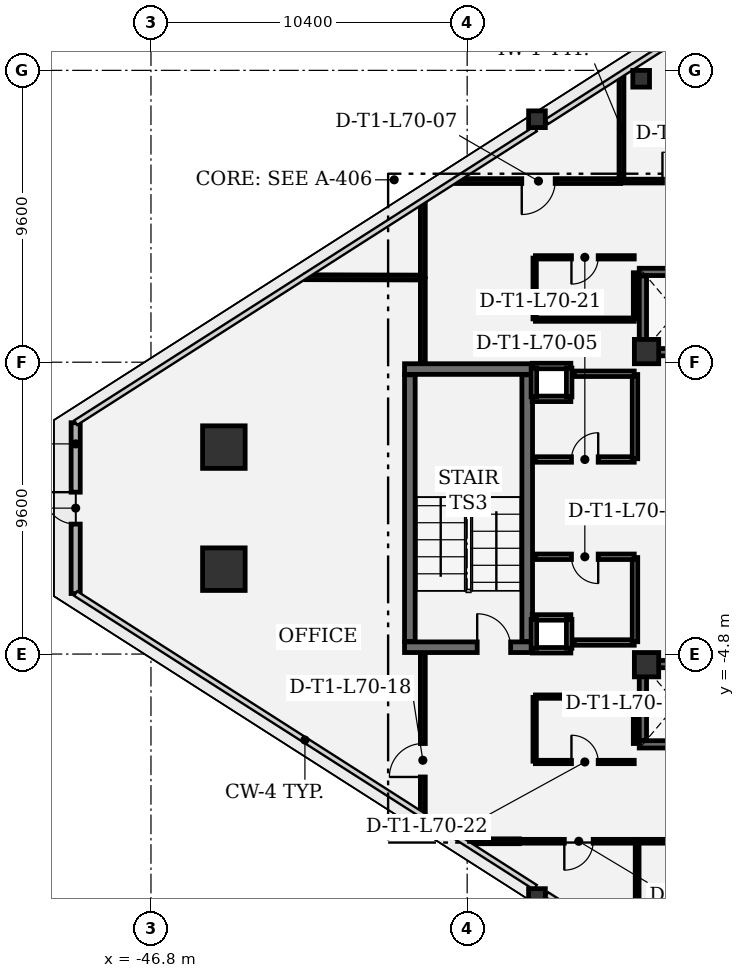
"""IFC4 building model, lengths in metres.
Left out: names, types, materials, properties, quantities, classifications, styles, units other than length and angle.
Written with IfcOpenShell. Run it as: python <this file> out.ifc"""

import sys

from ifc_helpers import new_model, si_unit, direction, frame, frame_2d, origin, origin_2d, place, context, subcontext, project, spatial, rectangle, extrude, element, fill, save


model = new_model("IFC4")
c1 = context("Model", 3, precision=1e-05, world=origin(), true_north=direction((0.0, 1.0)))
c2 = subcontext(c1, "Body", "Model", "MODEL_VIEW")
j1 = project(units=[si_unit("LENGTHUNIT", "METRE"), si_unit("PLANEANGLEUNIT", "RADIAN")], contexts=[c1])
p1 = place(None, origin())
s1 = spatial("IfcSite", under=j1, at=p1, CompositionType="ELEMENT")
p2 = place(p1, origin())
s2 = spatial("IfcBuilding", under=s1, at=p2, CompositionType="ELEMENT")
p3 = place(p2, frame((0.0, 0.0, 301.8)))
s3 = spatial("IfcBuildingStorey", under=s2, at=p3, CompositionType="ELEMENT", Elevation=301.8)
for number, where, z_axis, x_axis in (
    (1, (-44.403, 2.008, 0.0), (0.0, 0.0, 1.0), (1.0, 0.0, 0.0)),
    (2, (-44.403, -2.008, 0.0), (0.0, 0.0, 1.0), (1.0, 0.0, 0.0)),
):
    element("IfcColumn", number, at=place(p3, frame(where, z_axis=z_axis, x_axis=x_axis)), inside=s3, PredefinedType="COLUMN", context=c2, shape_type="SweptSolid", body=[
        extrude(rectangle(XDim=1.4, YDim=1.4, at=origin_2d()), origin(), (0.0, 0.0, 1.0), 4.2),
    ])
for number, where, z_axis, x_axis in (
    (3, (-30.5, 5.15, 0.0), (0.0, 0.0, 1.0), (1.0, 0.0, 0.0)),
    (4, (-30.5, -5.15, 0.0), (0.0, 0.0, 1.0), (1.0, 0.0, 0.0)),
):
    element("IfcColumn", number, at=place(p3, frame(where, z_axis=z_axis, x_axis=x_axis)), inside=s3, PredefinedType="COLUMN", context=c2, shape_type="SweptSolid", body=[
        extrude(rectangle(XDim=0.8, YDim=0.8, at=origin_2d()), origin(), (0.0, 0.0, 1.0), 4.2),
    ])
for number, where, z_axis, x_axis in (
    (5, (-34.104, 12.792, 0.0), (0.0, 0.0, 1.0), (1.0, 0.0, 0.0)),
    (6, (-34.104, -12.792, 0.0), (0.0, 0.0, 1.0), (1.0, 0.0, 0.0)),
    (7, (-30.677, 14.124, 0.0), (0.0, 0.0, 1.0), (1.0, 0.0, 0.0)),
):
    element("IfcColumn", number, at=place(p3, frame(where, z_axis=z_axis, x_axis=x_axis)), inside=s3, PredefinedType="COLUMN", context=c2, shape_type="SweptSolid", body=[
        extrude(rectangle(XDim=0.55, YDim=0.55, at=origin_2d()), origin(), (0.0, 0.0, 1.0), 4.2),
    ])
p4 = place(p3, frame((-49.277, -2.809, 0.0), z_axis=(0.0, 0.0, 1.0), x_axis=(0.0, 1.0, 0.0)))
e8 = element("IfcWall", 8, at=p4, inside=s3, PredefinedType="SOLIDWALL", context=c2, shape_type="SweptSolid", body=[
    extrude(rectangle(XDim=5.619, YDim=0.3, at=frame_2d((2.809, 0.0))), origin(), (0.0, 0.0, 1.0), 3.91),
])
p5 = place(p4, frame((2.284, 0.0, 0.0)))
e9 = element("IfcOpeningElement", 9, at=p5, cuts=e8, PredefinedType="OPENING", context=c2, shape_type="SweptSolid", body=[
    extrude(rectangle(XDim=1.05, YDim=2.2, at=frame_2d((0.525, 1.1))), frame((0.0, 0.16, 0.0), z_axis=(0.0, -1.0, 0.0), x_axis=(1.0, 0.0, 0.0)), (0.0, 0.0, 1.0), 0.32),
])
p6 = place(p3, frame((-38.46, -4.575, 0.0), z_axis=(0.0, 0.0, 1.0), x_axis=(1.0, 0.0, 0.0)))
e10 = element("IfcWall", 10, at=p6, inside=s3, PredefinedType="SHEAR", context=c2, shape_type="SweptSolid", body=[
    extrude(rectangle(XDim=4.21, YDim=0.35, at=frame_2d((2.105, 0.0))), origin(), (0.0, 0.0, 1.0), 3.91),
])
p7 = place(p6, frame((2.39, 0.0, 0.0)))
e11 = element("IfcOpeningElement", 11, at=p7, cuts=e10, PredefinedType="OPENING", context=c2, shape_type="SweptSolid", body=[
    extrude(rectangle(XDim=1.1, YDim=2.2, at=frame_2d((0.55, 1.1))), frame((0.0, 0.185, 0.0), z_axis=(0.0, -1.0, 0.0), x_axis=(1.0, 0.0, 0.0)), (0.0, 0.0, 1.0), 0.37),
])
p8 = place(p3, frame((-34.25, 4.575, 0.0), z_axis=(0.0, 0.0, 1.0), x_axis=(-1.0, 0.0, 0.0)))
e12 = element("IfcWall", 12, at=p8, inside=s3, PredefinedType="SHEAR", context=c2, shape_type="SweptSolid", body=[
    extrude(rectangle(XDim=4.21, YDim=0.35, at=frame_2d((2.105, 0.0))), origin(), (0.0, 0.0, 1.0), 3.91),
])
for number, where, z_axis, x_axis in (
    (13, (-34.425, -4.385, 0.0), (0.0, 0.0, 1.0), (0.0, 1.0, 0.0)),
    (14, (-38.285, 4.385, 0.0), (0.0, 0.0, 1.0), (0.0, -1.0, 0.0)),
):
    element("IfcWall", number, at=place(p3, frame(where, z_axis=z_axis, x_axis=x_axis)), inside=s3, PredefinedType="SHEAR", context=c2, shape_type="SweptSolid", body=[
        extrude(rectangle(XDim=8.77, YDim=0.35, at=frame_2d((4.385, 0.0))), origin(), (0.0, 0.0, 1.0), 3.91),
    ])
for number, where, z_axis, x_axis in (
    (15, (-28.26, 5.13, 0.0), (0.0, 0.0, 1.0), (-1.0, 0.0, 0.0)),
    (16, (-30.74, 7.77, 0.0), (0.0, 0.0, 1.0), (1.0, 0.0, 0.0)),
):
    element("IfcWall", number, at=place(p3, frame(where, z_axis=z_axis, x_axis=x_axis)), inside=s3, PredefinedType="SHEAR", context=c2, shape_type="SweptSolid", body=[
        extrude(rectangle(XDim=2.48, YDim=0.24, at=frame_2d((1.24, 0.0))), origin(), (0.0, 0.0, 1.0), 3.91),
    ])
p9 = place(p3, frame((-30.62, 5.262, 0.0), z_axis=(0.0, 0.0, 1.0), x_axis=(0.0, 1.0, 0.0)))
e17 = element("IfcWall", 17, at=p9, inside=s3, PredefinedType="SHEAR", context=c2, shape_type="SweptSolid", body=[
    extrude(rectangle(XDim=2.376, YDim=0.24, at=frame_2d((1.188, 0.0))), origin(), (0.0, 0.0, 1.0), 3.91),
])
for number, where, z_axis, x_axis in (
    (18, (-28.26, -7.77, 0.0), (0.0, 0.0, 1.0), (-1.0, 0.0, 0.0)),
    (19, (-30.74, -5.13, 0.0), (0.0, 0.0, 1.0), (1.0, 0.0, 0.0)),
):
    element("IfcWall", number, at=place(p3, frame(where, z_axis=z_axis, x_axis=x_axis)), inside=s3, PredefinedType="SHEAR", context=c2, shape_type="SweptSolid", body=[
        extrude(rectangle(XDim=2.48, YDim=0.24, at=frame_2d((1.24, 0.0))), origin(), (0.0, 0.0, 1.0), 3.91),
    ])
p10 = place(p3, frame((-30.62, -7.638, 0.0), z_axis=(0.0, 0.0, 1.0), x_axis=(0.0, 1.0, 0.0)))
e20 = element("IfcWall", 20, at=p10, inside=s3, PredefinedType="SHEAR", context=c2, shape_type="SweptSolid", body=[
    extrude(rectangle(XDim=2.376, YDim=0.24, at=frame_2d((1.188, 0.0))), origin(), (0.0, 0.0, 1.0), 3.91),
])
for number, where, z_axis, x_axis in (
    (21, (-32.99, 3.595, 0.0), (0.0, 0.0, 1.0), (-1.0, 0.0, 0.0)),
    (22, (-34.26, 4.675, 0.0), (0.0, 0.0, 1.0), (1.0, 0.0, 0.0)),
):
    element("IfcWall", number, at=place(p3, frame(where, z_axis=z_axis, x_axis=x_axis)), inside=s3, PredefinedType="PARTITIONING", context=c2, shape_type="SweptSolid", body=[
        extrude(rectangle(XDim=1.27, YDim=0.18, at=frame_2d((0.635, 0.0))), origin(), (0.0, 0.0, 1.0), 3.91),
    ])
for number, where, z_axis, x_axis in (
    (23, (-34.205, 3.66, 0.0), (0.0, 0.0, 1.0), (0.0, 1.0, 0.0)),
    (24, (-33.045, 4.61, 0.0), (0.0, 0.0, 1.0), (0.0, -1.0, 0.0)),
):
    element("IfcWall", number, at=place(p3, frame(where, z_axis=z_axis, x_axis=x_axis)), inside=s3, PredefinedType="PARTITIONING", context=c2, shape_type="SweptSolid", body=[
        extrude(rectangle(XDim=0.95, YDim=0.18, at=frame_2d((0.475, 0.0))), origin(), (0.0, 0.0, 1.0), 3.91),
    ])
for number, where, z_axis, x_axis in (
    (25, (-32.99, -4.675, 0.0), (0.0, 0.0, 1.0), (-1.0, 0.0, 0.0)),
    (26, (-34.26, -3.595, 0.0), (0.0, 0.0, 1.0), (1.0, 0.0, 0.0)),
):
    element("IfcWall", number, at=place(p3, frame(where, z_axis=z_axis, x_axis=x_axis)), inside=s3, PredefinedType="PARTITIONING", context=c2, shape_type="SweptSolid", body=[
        extrude(rectangle(XDim=1.27, YDim=0.18, at=frame_2d((0.635, 0.0))), origin(), (0.0, 0.0, 1.0), 3.91),
    ])
for number, where, z_axis, x_axis in (
    (27, (-34.205, -4.61, 0.0), (0.0, 0.0, 1.0), (0.0, 1.0, 0.0)),
    (28, (-33.045, -3.66, 0.0), (0.0, 0.0, 1.0), (0.0, -1.0, 0.0)),
):
    element("IfcWall", number, at=place(p3, frame(where, z_axis=z_axis, x_axis=x_axis)), inside=s3, PredefinedType="PARTITIONING", context=c2, shape_type="SweptSolid", body=[
        extrude(rectangle(XDim=0.95, YDim=0.18, at=frame_2d((0.475, 0.0))), origin(), (0.0, 0.0, 1.0), 3.91),
    ])
p11 = place(p3, frame((-34.18, 8.225, 0.0), z_axis=(0.0, 0.0, 1.0), x_axis=(0.0, -1.0, 0.0)))
e29 = element("IfcWall", 29, at=p11, inside=s3, PredefinedType="PARTITIONING", context=c2, shape_type="SweptSolid", body=[
    extrude(rectangle(XDim=2.0, YDim=0.11, at=frame_2d((1.0, 0.0))), origin(), (0.0, 0.0, 1.0), 3.91),
])
p12 = place(p3, frame((-34.155, 6.2, 0.0), z_axis=(0.0, 0.0, 1.0), x_axis=(1.0, 0.0, 0.0)))
e30 = element("IfcWall", 30, at=p12, inside=s3, PredefinedType="PARTITIONING", context=c2, shape_type="SweptSolid", body=[
    extrude(rectangle(XDim=3.25, YDim=0.11, at=frame_2d((1.625, 0.0))), origin(), (0.0, 0.0, 1.0), 3.529),
])
p13 = place(p3, frame((-30.88, 6.225, 0.0), z_axis=(0.0, 0.0, 1.0), x_axis=(0.0, 1.0, 0.0)))
e31 = element("IfcWall", 31, at=p13, inside=s3, PredefinedType="PARTITIONING", context=c2, shape_type="SweptSolid", body=[
    extrude(rectangle(XDim=1.518, YDim=0.11, at=frame_2d((0.759, 0.0))), origin(), (0.0, 0.0, 1.0), 3.91),
])
p14 = place(p3, frame((-30.905, 8.25, 0.0), z_axis=(0.0, 0.0, 1.0), x_axis=(-1.0, 0.0, 0.0)))
e32 = element("IfcWall", 32, at=p14, inside=s3, PredefinedType="PARTITIONING", context=c2, shape_type="SweptSolid", body=[
    extrude(rectangle(XDim=3.25, YDim=0.11, at=frame_2d((1.625, 0.0))), origin(), (0.0, 0.0, 1.0), 3.13),
])
p15 = place(p14, frame((1.185, 0.0, 0.0)))
e33 = element("IfcOpeningElement", 33, at=p15, cuts=e32, PredefinedType="OPENING", context=c2, shape_type="SweptSolid", body=[
    extrude(rectangle(XDim=0.88, YDim=2.1, at=frame_2d((0.44, 1.05))), frame((0.0, 0.065, 0.0), z_axis=(0.0, -1.0, 0.0), x_axis=(1.0, 0.0, 0.0)), (0.0, 0.0, 1.0), 0.13),
])
p16 = place(p3, frame((-34.18, -6.225, 0.0), z_axis=(0.0, 0.0, 1.0), x_axis=(0.0, -1.0, 0.0)))
e34 = element("IfcWall", 34, at=p16, inside=s3, PredefinedType="PARTITIONING", context=c2, shape_type="SweptSolid", body=[
    extrude(rectangle(XDim=2.1, YDim=0.11, at=frame_2d((1.05, 0.0))), origin(), (0.0, 0.0, 1.0), 3.91),
])
p17 = place(p3, frame((-34.155, -8.35, 0.0), z_axis=(0.0, 0.0, 1.0), x_axis=(1.0, 0.0, 0.0)))
e35 = element("IfcWall", 35, at=p17, inside=s3, PredefinedType="PARTITIONING", context=c2, shape_type="SweptSolid", body=[
    extrude(rectangle(XDim=3.25, YDim=0.11, at=frame_2d((1.625, 0.0))), origin(), (0.0, 0.0, 1.0), 3.13),
])
p18 = place(p17, frame((1.185, 0.0, 0.0)))
e36 = element("IfcOpeningElement", 36, at=p18, cuts=e35, PredefinedType="OPENING", context=c2, shape_type="SweptSolid", body=[
    extrude(rectangle(XDim=0.88, YDim=2.1, at=frame_2d((0.44, 1.05))), frame((0.0, 0.065, 0.0), z_axis=(0.0, -1.0, 0.0), x_axis=(1.0, 0.0, 0.0)), (0.0, 0.0, 1.0), 0.13),
])
p19 = place(p3, frame((-30.88, -7.743, 0.0), z_axis=(0.0, 0.0, 1.0), x_axis=(0.0, 1.0, 0.0)))
e37 = element("IfcWall", 37, at=p19, inside=s3, PredefinedType="PARTITIONING", context=c2, shape_type="SweptSolid", body=[
    extrude(rectangle(XDim=1.518, YDim=0.11, at=frame_2d((0.759, 0.0))), origin(), (0.0, 0.0, 1.0), 3.91),
])
p20 = place(p3, frame((-30.905, -6.2, 0.0), z_axis=(0.0, 0.0, 1.0), x_axis=(-1.0, 0.0, 0.0)))
e38 = element("IfcWall", 38, at=p20, inside=s3, PredefinedType="PARTITIONING", context=c2, shape_type="SweptSolid", body=[
    extrude(rectangle(XDim=3.25, YDim=0.11, at=frame_2d((1.625, 0.0))), origin(), (0.0, 0.0, 1.0), 3.529),
])
p21 = place(p3, frame((-34.155, 1.6, 0.0), z_axis=(0.0, 0.0, 1.0), x_axis=(1.0, 0.0, 0.0)))
e39 = element("IfcWall", 39, at=p21, inside=s3, PredefinedType="PARTITIONING", context=c2, shape_type="SweptSolid", body=[
    extrude(rectangle(XDim=3.25, YDim=0.18, at=frame_2d((1.625, 0.0))), origin(), (0.0, 0.0, 1.0), 3.91),
])
p22 = place(p21, frame((1.185, 0.0, 0.0)))
e40 = element("IfcOpeningElement", 40, at=p22, cuts=e39, PredefinedType="OPENING", context=c2, shape_type="SweptSolid", body=[
    extrude(rectangle(XDim=0.88, YDim=2.1, at=frame_2d((0.44, 1.05))), frame((0.0, 0.1, 0.0), z_axis=(0.0, -1.0, 0.0), x_axis=(1.0, 0.0, 0.0)), (0.0, 0.0, 1.0), 0.2),
])
p23 = place(p3, frame((-30.88, 1.625, 0.0), z_axis=(0.0, 0.0, 1.0), x_axis=(0.0, 1.0, 0.0)))
e41 = element("IfcWall", 41, at=p23, inside=s3, PredefinedType="PARTITIONING", context=c2, shape_type="SweptSolid", body=[
    extrude(rectangle(XDim=2.77, YDim=0.18, at=frame_2d((1.385, 0.0))), origin(), (0.0, 0.0, 1.0), 3.91),
])
for number, where, z_axis, x_axis in (
    (42, (-30.905, 4.42, 0.0), (0.0, 0.0, 1.0), (-1.0, 0.0, 0.0)),
    (43, (-32.88, -4.42, 0.0), (0.0, 0.0, 1.0), (1.0, 0.0, 0.0)),
):
    element("IfcWall", number, at=place(p3, frame(where, z_axis=z_axis, x_axis=x_axis)), inside=s3, PredefinedType="PARTITIONING", context=c2, shape_type="SweptSolid", body=[
        extrude(rectangle(XDim=1.975, YDim=0.18, at=frame_2d((0.988, 0.0))), origin(), (0.0, 0.0, 1.0), 3.91),
    ])
p24 = place(p3, frame((-30.88, -4.395, 0.0), z_axis=(0.0, 0.0, 1.0), x_axis=(0.0, 1.0, 0.0)))
e44 = element("IfcWall", 44, at=p24, inside=s3, PredefinedType="PARTITIONING", context=c2, shape_type="SweptSolid", body=[
    extrude(rectangle(XDim=2.77, YDim=0.18, at=frame_2d((1.385, 0.0))), origin(), (0.0, 0.0, 1.0), 3.91),
])
p25 = place(p3, frame((-30.905, -1.6, 0.0), z_axis=(0.0, 0.0, 1.0), x_axis=(-1.0, 0.0, 0.0)))
e45 = element("IfcWall", 45, at=p25, inside=s3, PredefinedType="PARTITIONING", context=c2, shape_type="SweptSolid", body=[
    extrude(rectangle(XDim=3.25, YDim=0.18, at=frame_2d((1.625, 0.0))), origin(), (0.0, 0.0, 1.0), 3.91),
])
p26 = place(p25, frame((1.185, 0.0, 0.0)))
e46 = element("IfcOpeningElement", 46, at=p26, cuts=e45, PredefinedType="OPENING", context=c2, shape_type="SweptSolid", body=[
    extrude(rectangle(XDim=0.88, YDim=2.1, at=frame_2d((0.44, 1.05))), frame((0.0, 0.1, 0.0), z_axis=(0.0, -1.0, 0.0), x_axis=(1.0, 0.0, 0.0)), (0.0, 0.0, 1.0), 0.2),
])
p27 = place(p3, frame((-37.858, 10.027, 0.0), z_axis=(0.0, 0.0, 1.0), x_axis=(0.0, -1.0, 0.0)))
e47 = element("IfcWall", 47, at=p27, inside=s3, PredefinedType="PARTITIONING", context=c2, shape_type="SweptSolid", body=[
    extrude(rectangle(XDim=2.417, YDim=0.16, at=frame_2d((1.208, 0.0))), origin(), (0.0, 0.0, 1.0), 3.91),
])
p28 = place(p3, frame((-31.35, 10.758, 0.0), z_axis=(0.0, 0.0, 1.0), x_axis=(-1.0, 0.0, 0.0)))
e48 = element("IfcWall", 48, at=p28, inside=s3, PredefinedType="PARTITIONING", context=c2, shape_type="SweptSolid", body=[
    extrude(rectangle(XDim=5.41, YDim=0.16, at=frame_2d((2.705, 0.0))), origin(), (0.0, 0.0, 1.0), 3.91),
])
p29 = place(p28, frame((2.155, 0.0, 0.0)))
e49 = element("IfcOpeningElement", 49, at=p29, cuts=e48, PredefinedType="OPENING", context=c2, shape_type="SweptSolid", body=[
    extrude(rectangle(XDim=1.1, YDim=2.15, at=frame_2d((0.55, 1.075))), frame((0.0, 0.09, 0.0), z_axis=(0.0, -1.0, 0.0), x_axis=(1.0, 0.0, 0.0)), (0.0, 0.0, 1.0), 0.18),
])
p30 = place(p3, frame((-31.324, 10.783, 0.0), z_axis=(0.0, 0.0, 1.0), x_axis=(0.0, 1.0, 0.0)))
e50 = element("IfcWall", 50, at=p30, inside=s3, PredefinedType="PARTITIONING", context=c2, shape_type="SweptSolid", body=[
    extrude(rectangle(XDim=3.42, YDim=0.16, at=frame_2d((1.71, 0.0))), origin(), (0.0, 0.0, 1.0), 3.91),
])
p31 = place(p3, frame((-41.708, 7.595, 0.0), z_axis=(0.0, 0.0, 1.0), x_axis=(0.9999965762, -0.002616789611, 0.0)))
e51 = element("IfcWall", 51, at=p31, inside=s3, PredefinedType="PARTITIONING", context=c2, shape_type="SweptSolid", body=[
    extrude(rectangle(XDim=3.825, YDim=0.16, at=frame_2d((1.913, 0.0))), origin(), (0.0, 0.0, 1.0), 3.91),
])
p32 = place(p3, frame((-31.292, 10.758, 0.0), z_axis=(0.0, 0.0, 1.0), x_axis=(1.0, 0.0, 0.0)))
e52 = element("IfcWall", 52, at=p32, inside=s3, PredefinedType="PARTITIONING", context=c2, shape_type="SweptSolid", body=[
    extrude(rectangle(XDim=10.153, YDim=0.125, at=frame_2d((5.076, 0.0))), origin(), (0.0, 0.0, 1.0), 3.13),
])
p33 = place(p32, frame((1.315, 0.0, 0.0)))
e53 = element("IfcOpeningElement", 53, at=p33, cuts=e52, PredefinedType="OPENING", context=c2, shape_type="SweptSolid", body=[
    extrude(rectangle(XDim=0.95, YDim=2.15, at=frame_2d((0.475, 1.075))), frame((0.0, 0.073, 0.0), z_axis=(0.0, -1.0, 0.0), x_axis=(1.0, 0.0, 0.0)), (0.0, 0.0, 1.0), 0.145),
])
p34 = place(p3, frame((-30.809, -13.784, 0.0), z_axis=(0.0, 0.0, 1.0), x_axis=(0.0, 1.0, 0.0)))
e54 = element("IfcWall", 54, at=p34, inside=s3, PredefinedType="PARTITIONING", context=c2, shape_type="SweptSolid", body=[
    extrude(rectangle(XDim=2.801, YDim=0.125, at=frame_2d((1.401, 0.0))), origin(), (0.0, 0.0, 1.0), 3.91),
])
p35 = place(p3, frame((-30.834, -10.958, 0.0), z_axis=(0.0, 0.0, 1.0), x_axis=(-1.0, 0.0, 0.0)))
e55 = element("IfcWall", 55, at=p35, inside=s3, PredefinedType="PARTITIONING", context=c2, shape_type="SweptSolid", body=[
    extrude(rectangle(XDim=3.791, YDim=0.125, at=frame_2d((1.896, 0.0))), origin(), (0.0, 0.0, 1.0), 3.91),
])
p36 = place(p35, frame((1.42, 0.0, 0.0)))
e56 = element("IfcOpeningElement", 56, at=p36, cuts=e55, PredefinedType="OPENING", context=c2, shape_type="SweptSolid", body=[
    extrude(rectangle(XDim=0.95, YDim=2.15, at=frame_2d((0.475, 1.075))), frame((0.0, 0.073, 0.0), z_axis=(0.0, -1.0, 0.0), x_axis=(1.0, 0.0, 0.0)), (0.0, 0.0, 1.0), 0.145),
])
p37 = place(p3, frame((-22.832, -10.958, 0.0), z_axis=(0.0, 0.0, 1.0), x_axis=(-1.0, 0.0, 0.0)))
e57 = element("IfcWall", 57, at=p37, inside=s3, PredefinedType="PARTITIONING", context=c2, shape_type="SweptSolid", body=[
    extrude(rectangle(XDim=7.944, YDim=0.125, at=frame_2d((3.972, 0.0))), origin(), (0.0, 0.0, 1.0), 3.13),
])
p38 = place(p37, frame((5.995, 0.0, 0.0)))
e58 = element("IfcOpeningElement", 58, at=p38, cuts=e57, PredefinedType="OPENING", context=c2, shape_type="SweptSolid", body=[
    extrude(rectangle(XDim=0.95, YDim=2.15, at=frame_2d((0.475, 1.075))), frame((0.0, 0.073, 0.0), z_axis=(0.0, -1.0, 0.0), x_axis=(1.0, 0.0, 0.0)), (0.0, 0.0, 1.0), 0.145),
])
p39 = place(p3, frame((-36.447, -10.958, 0.0), z_axis=(0.0, 0.0, 1.0), x_axis=(1.0, 0.0, 0.0)))
e59 = element("IfcWall", 59, at=p39, inside=s3, PredefinedType="PARTITIONING", context=c2, shape_type="SweptSolid", body=[
    extrude(rectangle(XDim=1.764, YDim=0.16, at=frame_2d((0.882, 0.0))), origin(), (0.0, 0.0, 1.0), 3.91),
])
p40 = place(p3, frame((-37.858, -10.027, 0.0), z_axis=(0.0, 0.0, 1.0), x_axis=(0.0, 1.0, 0.0)))
e60 = element("IfcWall", 60, at=p40, inside=s3, PredefinedType="PARTITIONING", context=c2, shape_type="SweptSolid", body=[
    extrude(rectangle(XDim=5.244, YDim=0.16, at=frame_2d((2.622, 0.0))), origin(), (0.0, 0.0, 1.0), 3.91),
])
p41 = place(p40, frame((1.184, 0.0, 0.0)))
e61 = element("IfcOpeningElement", 61, at=p41, cuts=e60, PredefinedType="OPENING", context=c2, shape_type="SweptSolid", body=[
    extrude(rectangle(XDim=1.1, YDim=2.15, at=frame_2d((0.55, 1.075))), frame((0.0, 0.09, 0.0), z_axis=(0.0, -1.0, 0.0), x_axis=(1.0, 0.0, 0.0)), (0.0, 0.0, 1.0), 0.18),
])
p42 = place(p3, frame((-37.858, 4.783, 0.0), z_axis=(0.0, 0.0, 1.0), x_axis=(0.0, 1.0, 0.0)))
e62 = element("IfcWall", 62, at=p42, inside=s3, PredefinedType="PARTITIONING", context=c2, shape_type="SweptSolid", body=[
    extrude(rectangle(XDim=2.769, YDim=0.16, at=frame_2d((1.384, 0.0))), origin(), (0.0, 0.0, 1.0), 3.91),
])
p43 = place(p5, origin())
e63 = element("IfcDoor", 63, at=p43, inside=s3, OperationType="SINGLE_SWING_RIGHT", PredefinedType="DOOR", context=c2, shape_type="SweptSolid", body=[
    extrude(rectangle(XDim=1.05, YDim=2.2, at=frame_2d((0.525, 1.1))), frame((0.0, 0.025, 0.0), z_axis=(0.0, -1.0, 0.0), x_axis=(1.0, 0.0, 0.0)), (0.0, 0.0, 1.0), 0.05),
])
fill(e9, e63)
p44 = place(p7, origin())
e64 = element("IfcDoor", 64, at=p44, inside=s3, OperationType="SINGLE_SWING_LEFT", PredefinedType="DOOR", context=c2, shape_type="SweptSolid", body=[
    extrude(rectangle(XDim=1.1, YDim=2.2, at=frame_2d((0.55, 1.1))), frame((0.0, 0.025, 0.0), z_axis=(0.0, -1.0, 0.0), x_axis=(1.0, 0.0, 0.0)), (0.0, 0.0, 1.0), 0.05),
])
fill(e11, e64)
p45 = place(p22, origin())
e65 = element("IfcDoor", 65, at=p45, inside=s3, OperationType="SINGLE_SWING_RIGHT", PredefinedType="DOOR", context=c2, shape_type="SweptSolid", body=[
    extrude(rectangle(XDim=0.88, YDim=2.1, at=frame_2d((0.44, 1.05))), frame((0.0, 0.025, 0.0), z_axis=(0.0, -1.0, 0.0), x_axis=(1.0, 0.0, 0.0)), (0.0, 0.0, 1.0), 0.05),
])
fill(e40, e65)
p46 = place(p26, origin())
e66 = element("IfcDoor", 66, at=p46, inside=s3, OperationType="SINGLE_SWING_LEFT", PredefinedType="DOOR", context=c2, shape_type="SweptSolid", body=[
    extrude(rectangle(XDim=0.88, YDim=2.1, at=frame_2d((0.44, 1.05))), frame((0.0, 0.025, 0.0), z_axis=(0.0, -1.0, 0.0), x_axis=(1.0, 0.0, 0.0)), (0.0, 0.0, 1.0), 0.05),
])
fill(e46, e66)
p47 = place(p29, origin())
e67 = element("IfcDoor", 67, at=p47, inside=s3, OperationType="SINGLE_SWING_RIGHT", PredefinedType="DOOR", context=c2, shape_type="SweptSolid", body=[
    extrude(rectangle(XDim=1.1, YDim=2.15, at=frame_2d((0.55, 1.075))), frame((0.0, 0.025, 0.0), z_axis=(0.0, -1.0, 0.0), x_axis=(1.0, 0.0, 0.0)), (0.0, 0.0, 1.0), 0.05),
])
fill(e49, e67)
p48 = place(p33, origin())
e68 = element("IfcDoor", 68, at=p48, inside=s3, OperationType="SINGLE_SWING_LEFT", PredefinedType="DOOR", context=c2, shape_type="SweptSolid", body=[
    extrude(rectangle(XDim=0.95, YDim=2.15, at=frame_2d((0.475, 1.075))), frame((0.0, 0.025, 0.0), z_axis=(0.0, -1.0, 0.0), x_axis=(1.0, 0.0, 0.0)), (0.0, 0.0, 1.0), 0.05),
])
fill(e53, e68)
p49 = place(p36, origin())
e69 = element("IfcDoor", 69, at=p49, inside=s3, OperationType="SINGLE_SWING_RIGHT", PredefinedType="DOOR", context=c2, shape_type="SweptSolid", body=[
    extrude(rectangle(XDim=0.95, YDim=2.15, at=frame_2d((0.475, 1.075))), frame((0.0, 0.025, 0.0), z_axis=(0.0, -1.0, 0.0), x_axis=(1.0, 0.0, 0.0)), (0.0, 0.0, 1.0), 0.05),
])
fill(e56, e69)
p50 = place(p41, origin())
e70 = element("IfcDoor", 70, at=p50, inside=s3, OperationType="SINGLE_SWING_LEFT", PredefinedType="DOOR", context=c2, shape_type="SweptSolid", body=[
    extrude(rectangle(XDim=1.1, YDim=2.15, at=frame_2d((0.55, 1.075))), frame((0.0, 0.025, 0.0), z_axis=(0.0, -1.0, 0.0), x_axis=(1.0, 0.0, 0.0)), (0.0, 0.0, 1.0), 0.05),
])
fill(e61, e70)
p51 = place(p15, origin())
e71 = element("IfcDoor", 71, at=p51, inside=s3, OperationType="SINGLE_SWING_RIGHT", PredefinedType="DOOR", context=c2, shape_type="SweptSolid", body=[
    extrude(rectangle(XDim=0.88, YDim=2.1, at=frame_2d((0.44, 1.05))), frame((0.0, 0.025, 0.0), z_axis=(0.0, -1.0, 0.0), x_axis=(1.0, 0.0, 0.0)), (0.0, 0.0, 1.0), 0.05),
])
fill(e33, e71)
p52 = place(p18, origin())
e72 = element("IfcDoor", 72, at=p52, inside=s3, OperationType="SINGLE_SWING_LEFT", PredefinedType="DOOR", context=c2, shape_type="SweptSolid", body=[
    extrude(rectangle(XDim=0.88, YDim=2.1, at=frame_2d((0.44, 1.05))), frame((0.0, 0.025, 0.0), z_axis=(0.0, -1.0, 0.0), x_axis=(1.0, 0.0, 0.0)), (0.0, 0.0, 1.0), 0.05),
])
fill(e36, e72)
save(model, sys.argv[1])
